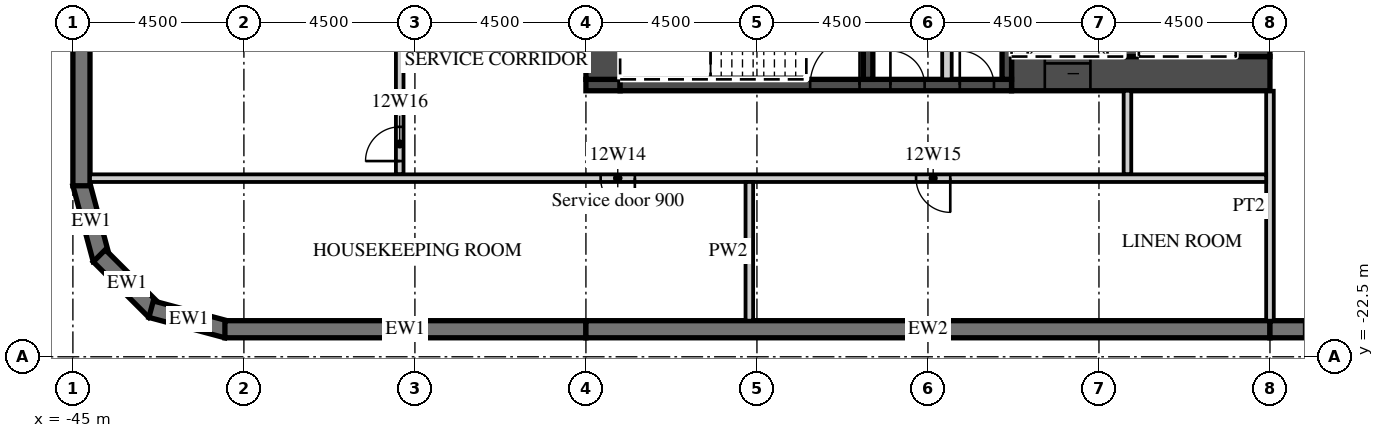
"""IFC4 building model, lengths in metres.
Left out: names, types, materials, properties, quantities, classifications, styles, units other than length and angle.
Written with IfcOpenShell. Run it as: python <this file> out.ifc"""

import sys

from ifc_helpers import new_model, si_unit, direction, frame, frame_2d, origin, place, context, subcontext, project, spatial, polyline, rectangle, outline, extrude, element, fill, save


model = new_model("IFC4")
c1 = context("Model", 3, precision=1e-05, world=origin(), true_north=direction((0.0, 1.0)))
c2 = subcontext(c1, "Body", "Model", "MODEL_VIEW")
j1 = project(units=[si_unit("LENGTHUNIT", "METRE"), si_unit("PLANEANGLEUNIT", "RADIAN")], contexts=[c1])
p1 = place(None, origin())
s1 = spatial("IfcSite", under=j1, at=p1, CompositionType="ELEMENT")
p2 = place(p1, origin())
s2 = spatial("IfcBuilding", under=s1, at=p2, CompositionType="ELEMENT")
p3 = place(p2, frame((0.0, 0.0, 69.9)))
s3 = spatial("IfcBuildingStorey", under=s2, at=p3, CompositionType="ELEMENT", Elevation=69.9)
p4 = place(p3, frame((-44.783, -17.942, 0.0), z_axis=(0.0, 0.0, 1.0), x_axis=(0.25881466832, -0.965926999034, 0.0)))
e1 = element("IfcWall", 1, at=p4, inside=s3, PredefinedType="SOLIDWALL", context=c2, shape_type="SweptSolid", body=[
    extrude(outline(polyline([(0.0, -0.225), (2.071, -0.225), (1.95, 0.225), (0.121, 0.225), (0.0, -0.225)])), origin(), (0.0, 0.0, 1.0), 3.02),
])
p5 = place(p3, frame((-44.305, -19.841, 0.0), z_axis=(0.0, 0.0, 1.0), x_axis=(0.707106781187, -0.707106781187, 0.0)))
e2 = element("IfcWall", 2, at=p5, inside=s3, PredefinedType="SOLIDWALL", context=c2, shape_type="SweptSolid", body=[
    extrude(outline(polyline([(0.0, -0.225), (2.071, -0.225), (1.95, 0.225), (0.121, 0.225), (0.0, -0.225)])), origin(), (0.0, 0.0, 1.0), 3.02),
])
p6 = place(p3, frame((-42.942, -21.247, 0.0), z_axis=(0.0, 0.0, 1.0), x_axis=(0.965926999034, -0.25881466832, 0.0)))
e3 = element("IfcWall", 3, at=p6, inside=s3, PredefinedType="SOLIDWALL", context=c2, shape_type="SweptSolid", body=[
    extrude(outline(polyline([(-0.0, -0.225), (2.07, -0.225), (1.95, 0.225), (0.12, 0.225), (-0.0, -0.225)])), origin(), (0.0, 0.0, 1.0), 3.02),
])
p7 = place(p3, frame((-41.0, -21.775, 0.0), z_axis=(0.0, 0.0, 1.0), x_axis=(1.0, 0.0, 0.0)))
e4 = element("IfcWall", 4, at=p7, inside=s3, PredefinedType="SOLIDWALL", context=c2, shape_type="SweptSolid", body=[
    extrude(rectangle(XDim=9.5, YDim=0.45, at=frame_2d((4.75, 0.0))), origin(), (0.0, 0.0, 1.0), 3.02),
])
p8 = place(p3, frame((-31.5, -21.775, 0.0), z_axis=(0.0, 0.0, 1.0), x_axis=(1.0, 0.0, 0.0)))
e5 = element("IfcWall", 5, at=p8, inside=s3, PredefinedType="SOLIDWALL", context=c2, shape_type="SweptSolid", body=[
    extrude(rectangle(XDim=18.0, YDim=0.45, at=frame_2d((9.0, 0.0))), origin(), (0.0, 0.0, 1.0), 3.02),
])
p9 = place(p3, frame((-13.5, -21.775, 0.0), z_axis=(0.0, 0.0, 1.0), x_axis=(1.0, 0.0, 0.0)))
e6 = element("IfcWall", 6, at=p9, inside=s3, PredefinedType="SOLIDWALL", context=c2, shape_type="SweptSolid", body=[
    extrude(rectangle(XDim=54.5, YDim=0.45, at=frame_2d((27.25, 0.0))), origin(), (0.0, 0.0, 1.0), 3.02),
])
p10 = place(p9, frame((0.9, 0.0, 0.45)))
e7 = element("IfcOpeningElement", 7, at=p10, cuts=e6, PredefinedType="OPENING", context=c2, shape_type="SweptSolid", body=[
    extrude(rectangle(XDim=2.7, YDim=2.25, at=frame_2d((1.35, 1.125))), frame((0.0, 0.235, 0.0), z_axis=(0.0, -1.0, 0.0), x_axis=(1.0, 0.0, 0.0)), (0.0, 0.0, 1.0), 0.47),
])
p11 = place(p9, frame((5.4, 0.0, 0.45)))
e8 = element("IfcOpeningElement", 8, at=p11, cuts=e6, PredefinedType="OPENING", context=c2, shape_type="SweptSolid", body=[
    extrude(rectangle(XDim=2.7, YDim=2.25, at=frame_2d((1.35, 1.125))), frame((0.0, 0.235, 0.0), z_axis=(0.0, -1.0, 0.0), x_axis=(1.0, 0.0, 0.0)), (0.0, 0.0, 1.0), 0.47),
])
p12 = place(p9, frame((9.9, 0.0, 0.45)))
e9 = element("IfcOpeningElement", 9, at=p12, cuts=e6, PredefinedType="OPENING", context=c2, shape_type="SweptSolid", body=[
    extrude(rectangle(XDim=2.7, YDim=2.25, at=frame_2d((1.35, 1.125))), frame((0.0, 0.235, 0.0), z_axis=(0.0, -1.0, 0.0), x_axis=(1.0, 0.0, 0.0)), (0.0, 0.0, 1.0), 0.47),
])
p13 = place(p9, frame((14.4, 0.0, 0.45)))
e10 = element("IfcOpeningElement", 10, at=p13, cuts=e6, PredefinedType="OPENING", context=c2, shape_type="SweptSolid", body=[
    extrude(rectangle(XDim=2.7, YDim=2.25, at=frame_2d((1.35, 1.125))), frame((0.0, 0.235, 0.0), z_axis=(0.0, -1.0, 0.0), x_axis=(1.0, 0.0, 0.0)), (0.0, 0.0, 1.0), 0.47),
])
p14 = place(p9, frame((18.9, 0.0, 0.45)))
e11 = element("IfcOpeningElement", 11, at=p14, cuts=e6, PredefinedType="OPENING", context=c2, shape_type="SweptSolid", body=[
    extrude(rectangle(XDim=2.7, YDim=2.25, at=frame_2d((1.35, 1.125))), frame((0.0, 0.235, 0.0), z_axis=(0.0, -1.0, 0.0), x_axis=(1.0, 0.0, 0.0)), (0.0, 0.0, 1.0), 0.47),
])
p15 = place(p9, frame((23.4, 0.0, 0.45)))
e12 = element("IfcOpeningElement", 12, at=p15, cuts=e6, PredefinedType="OPENING", context=c2, shape_type="SweptSolid", body=[
    extrude(rectangle(XDim=2.7, YDim=2.25, at=frame_2d((1.35, 1.125))), frame((0.0, 0.235, 0.0), z_axis=(0.0, -1.0, 0.0), x_axis=(1.0, 0.0, 0.0)), (0.0, 0.0, 1.0), 0.47),
])
p16 = place(p9, frame((27.9, 0.0, 0.45)))
e13 = element("IfcOpeningElement", 13, at=p16, cuts=e6, PredefinedType="OPENING", context=c2, shape_type="SweptSolid", body=[
    extrude(rectangle(XDim=2.7, YDim=2.25, at=frame_2d((1.35, 1.125))), frame((0.0, 0.235, 0.0), z_axis=(0.0, -1.0, 0.0), x_axis=(1.0, 0.0, 0.0)), (0.0, 0.0, 1.0), 0.47),
])
p17 = place(p9, frame((32.4, 0.0, 0.45)))
e14 = element("IfcOpeningElement", 14, at=p17, cuts=e6, PredefinedType="OPENING", context=c2, shape_type="SweptSolid", body=[
    extrude(rectangle(XDim=2.7, YDim=2.25, at=frame_2d((1.35, 1.125))), frame((0.0, 0.235, 0.0), z_axis=(0.0, -1.0, 0.0), x_axis=(1.0, 0.0, 0.0)), (0.0, 0.0, 1.0), 0.47),
])
p18 = place(p9, frame((36.9, 0.0, 0.45)))
e15 = element("IfcOpeningElement", 15, at=p18, cuts=e6, PredefinedType="OPENING", context=c2, shape_type="SweptSolid", body=[
    extrude(rectangle(XDim=2.7, YDim=2.25, at=frame_2d((1.35, 1.125))), frame((0.0, 0.235, 0.0), z_axis=(0.0, -1.0, 0.0), x_axis=(1.0, 0.0, 0.0)), (0.0, 0.0, 1.0), 0.47),
])
p19 = place(p9, frame((41.4, 0.0, 0.45)))
e16 = element("IfcOpeningElement", 16, at=p19, cuts=e6, PredefinedType="OPENING", context=c2, shape_type="SweptSolid", body=[
    extrude(rectangle(XDim=2.7, YDim=2.25, at=frame_2d((1.35, 1.125))), frame((0.0, 0.235, 0.0), z_axis=(0.0, -1.0, 0.0), x_axis=(1.0, 0.0, 0.0)), (0.0, 0.0, 1.0), 0.47),
])
p20 = place(p9, frame((45.9, 0.0, 0.45)))
e17 = element("IfcOpeningElement", 17, at=p20, cuts=e6, PredefinedType="OPENING", context=c2, shape_type="SweptSolid", body=[
    extrude(rectangle(XDim=2.7, YDim=2.25, at=frame_2d((1.35, 1.125))), frame((0.0, 0.235, 0.0), z_axis=(0.0, -1.0, 0.0), x_axis=(1.0, 0.0, 0.0)), (0.0, 0.0, 1.0), 0.47),
])
p21 = place(p9, frame((50.4, 0.0, 0.45)))
e18 = element("IfcOpeningElement", 18, at=p21, cuts=e6, PredefinedType="OPENING", context=c2, shape_type="SweptSolid", body=[
    extrude(rectangle(XDim=2.7, YDim=2.25, at=frame_2d((1.35, 1.125))), frame((0.0, 0.235, 0.0), z_axis=(0.0, -1.0, 0.0), x_axis=(1.0, 0.0, 0.0)), (0.0, 0.0, 1.0), 0.47),
])
p22 = place(p3, frame((-44.775, 18.0, 0.0), z_axis=(0.0, 0.0, 1.0), x_axis=(0.0, -1.0, 0.0)))
e19 = element("IfcWall", 19, at=p22, inside=s3, PredefinedType="SOLIDWALL", context=c2, shape_type="SweptSolid", body=[
    extrude(rectangle(XDim=36.0, YDim=0.45, at=frame_2d((18.0, 0.0))), origin(), (0.0, 0.0, 1.0), 3.02),
])
p23 = place(p22, frame((3.9, 0.0, 0.45)))
e20 = element("IfcOpeningElement", 20, at=p23, cuts=e19, PredefinedType="OPENING", context=c2, shape_type="SweptSolid", body=[
    extrude(rectangle(XDim=3.3, YDim=2.25, at=frame_2d((1.65, 1.125))), frame((0.0, 0.235, 0.0), z_axis=(0.0, -1.0, 0.0), x_axis=(1.0, 0.0, 0.0)), (0.0, 0.0, 1.0), 0.47),
])
p24 = place(p22, frame((8.4, 0.0, 0.45)))
e21 = element("IfcOpeningElement", 21, at=p24, cuts=e19, PredefinedType="OPENING", context=c2, shape_type="SweptSolid", body=[
    extrude(rectangle(XDim=3.3, YDim=2.25, at=frame_2d((1.65, 1.125))), frame((0.0, 0.235, 0.0), z_axis=(0.0, -1.0, 0.0), x_axis=(1.0, 0.0, 0.0)), (0.0, 0.0, 1.0), 0.47),
])
p25 = place(p22, frame((12.9, 0.0, 0.45)))
e22 = element("IfcOpeningElement", 22, at=p25, cuts=e19, PredefinedType="OPENING", context=c2, shape_type="SweptSolid", body=[
    extrude(rectangle(XDim=3.3, YDim=2.25, at=frame_2d((1.65, 1.125))), frame((0.0, 0.235, 0.0), z_axis=(0.0, -1.0, 0.0), x_axis=(1.0, 0.0, 0.0)), (0.0, 0.0, 1.0), 0.47),
])
p26 = place(p3, frame((-13.5, -21.55, 0.0), z_axis=(0.0, 0.0, 1.0), x_axis=(0.0, 1.0, 0.0)))
e23 = element("IfcWall", 23, at=p26, inside=s3, PredefinedType="PARTITIONING", context=c2, shape_type="SweptSolid", body=[
    extrude(rectangle(XDim=6.05, YDim=0.2, at=frame_2d((3.025, 0.0))), origin(), (0.0, 0.0, 1.0), 3.02),
])
p27 = place(p3, frame((-20.3, -15.05, 0.0), z_axis=(0.0, 0.0, 1.0), x_axis=(1.0, 0.0, 0.0)))
e24 = element("IfcWall", 24, at=p27, inside=s3, PredefinedType="SHEAR", context=c2, shape_type="SweptSolid", body=[
    extrude(rectangle(XDim=6.8, YDim=0.9, at=frame_2d((3.4, 0.0))), origin(), (0.0, 0.0, 1.0), 3.02),
])
p28 = place(p27, frame((0.875, 0.0, 0.0)))
e25 = element("IfcOpeningElement", 25, at=p28, cuts=e24, PredefinedType="OPENING", context=c2, shape_type="SweptSolid", body=[
    extrude(rectangle(XDim=1.2, YDim=2.1, at=frame_2d((0.6, 1.05))), frame((0.0, 0.46, 0.0), z_axis=(0.0, -1.0, 0.0), x_axis=(1.0, 0.0, 0.0)), (0.0, 0.0, 1.0), 0.92),
])
p29 = place(p3, frame((-31.5, -15.35, 0.0), z_axis=(0.0, 0.0, 1.0), x_axis=(1.0, 0.0, 0.0)))
e26 = element("IfcWall", 26, at=p29, inside=s3, PredefinedType="SHEAR", context=c2, shape_type="SweptSolid", body=[
    extrude(rectangle(XDim=0.9, YDim=0.3, at=frame_2d((0.45, 0.0))), origin(), (0.0, 0.0, 1.0), 3.02),
])
p30 = place(p3, frame((-30.6, -15.35, 0.0), z_axis=(0.0, 0.0, 1.0), x_axis=(1.0, 0.0, 0.0)))
e27 = element("IfcWall", 27, at=p30, inside=s3, PredefinedType="SHEAR", context=c2, shape_type="SweptSolid", body=[
    extrude(rectangle(XDim=10.3, YDim=0.3, at=frame_2d((5.15, 0.0))), origin(), (0.0, 0.0, 1.0), 3.02),
])
p31 = place(p30, frame((5.0, 0.0, 0.0)))
e28 = element("IfcOpeningElement", 28, at=p31, cuts=e27, PredefinedType="OPENING", context=c2, shape_type="SweptSolid", body=[
    extrude(rectangle(XDim=1.3, YDim=2.1, at=frame_2d((0.65, 1.05))), frame((0.0, 0.16, 0.0), z_axis=(0.0, -1.0, 0.0), x_axis=(1.0, 0.0, 0.0)), (0.0, 0.0, 1.0), 0.32),
])
p32 = place(p30, frame((7.113, 0.0, 0.0)))
e29 = element("IfcOpeningElement", 29, at=p32, cuts=e27, PredefinedType="OPENING", context=c2, shape_type="SweptSolid", body=[
    extrude(rectangle(XDim=0.9, YDim=2.1, at=frame_2d((0.45, 1.05))), frame((0.0, 0.16, 0.0), z_axis=(0.0, -1.0, 0.0), x_axis=(1.0, 0.0, 0.0)), (0.0, 0.0, 1.0), 0.32),
])
p33 = place(p30, frame((8.938, 0.0, 0.0)))
e30 = element("IfcOpeningElement", 30, at=p33, cuts=e27, PredefinedType="OPENING", context=c2, shape_type="SweptSolid", body=[
    extrude(rectangle(XDim=0.9, YDim=2.1, at=frame_2d((0.45, 1.05))), frame((0.0, 0.16, 0.0), z_axis=(0.0, -1.0, 0.0), x_axis=(1.0, 0.0, 0.0)), (0.0, 0.0, 1.0), 0.32),
])
p34 = place(p3, frame((-31.05, -15.2, 0.0), z_axis=(0.0, 0.0, 1.0), x_axis=(0.0, 1.0, 0.0)))
e31 = element("IfcWall", 31, at=p34, inside=s3, PredefinedType="SHEAR", context=c2, shape_type="SweptSolid", body=[
    extrude(rectangle(XDim=12.8, YDim=0.9, at=frame_2d((6.4, 0.0))), origin(), (0.0, 0.0, 1.0), 3.02),
])
p35 = place(p34, frame((11.5, 0.0, 0.0)))
e32 = element("IfcOpeningElement", 32, at=p35, cuts=e31, PredefinedType="OPENING", context=c2, shape_type="SweptSolid", body=[
    extrude(rectangle(XDim=1.1, YDim=2.1, at=frame_2d((0.55, 1.05))), frame((0.0, 0.46, 0.0), z_axis=(0.0, -1.0, 0.0), x_axis=(1.0, 0.0, 0.0)), (0.0, 0.0, 1.0), 0.92),
])
p36 = place(p3, frame((-13.95, -14.6, 0.0), z_axis=(0.0, 0.0, 1.0), x_axis=(0.0, 1.0, 0.0)))
e33 = element("IfcWall", 33, at=p36, inside=s3, PredefinedType="SHEAR", context=c2, shape_type="SweptSolid", body=[
    extrude(rectangle(XDim=12.2, YDim=0.9, at=frame_2d((6.1, 0.0))), origin(), (0.0, 0.0, 1.0), 3.02),
])
p37 = place(p3, frame((-17.15, -14.6, 0.0), z_axis=(0.0, 0.0, 1.0), x_axis=(0.0, 1.0, 0.0)))
e34 = element("IfcWall", 34, at=p37, inside=s3, PredefinedType="SHEAR", context=c2, shape_type="SweptSolid", body=[
    extrude(rectangle(XDim=5.8, YDim=0.4, at=frame_2d((2.9, 0.0))), origin(), (0.0, 0.0, 1.0), 3.02),
])
for number, where, z_axis, x_axis in (
    (35, (-20.425, -15.2, 0.0), (0.0, 0.0, 1.0), (0.0, 1.0, 0.0)),
    (36, (-24.075, -15.2, 0.0), (0.0, 0.0, 1.0), (0.0, 1.0, 0.0)),
):
    element("IfcWall", number, at=place(p3, frame(where, z_axis=z_axis, x_axis=x_axis)), inside=s3, PredefinedType="SHEAR", context=c2, shape_type="SweptSolid", body=[
        extrude(rectangle(XDim=3.25, YDim=0.25, at=frame_2d((1.625, 0.0))), origin(), (0.0, 0.0, 1.0), 3.02),
    ])
p38 = place(p3, frame((-22.0, -15.2, 0.0), z_axis=(0.0, 0.0, 1.0), x_axis=(0.0, 1.0, 0.0)))
e37 = element("IfcWall", 37, at=p38, inside=s3, PredefinedType="PARTITIONING", context=c2, shape_type="SweptSolid", body=[
    extrude(rectangle(XDim=3.25, YDim=0.25, at=frame_2d((1.625, 0.0))), origin(), (0.0, 0.0, 1.0), 3.02),
])
p39 = place(p3, frame((-17.25, -17.7, 0.0), z_axis=(0.0, 0.0, 1.0), x_axis=(0.0, 1.0, 0.0)))
e38 = element("IfcWall", 38, at=p39, inside=s3, PredefinedType="PARTITIONING", context=c2, shape_type="SweptSolid", body=[
    extrude(rectangle(XDim=2.2, YDim=0.2, at=frame_2d((1.1, 0.0))), origin(), (0.0, 0.0, 1.0), 3.02),
])
p40 = place(p3, frame((-36.4, -17.7, 0.0), z_axis=(0.0, 0.0, 1.0), x_axis=(0.0, 1.0, 0.0)))
e39 = element("IfcWall", 39, at=p40, inside=s3, PredefinedType="PARTITIONING", context=c2, shape_type="SweptSolid", body=[
    extrude(rectangle(XDim=15.95, YDim=0.2, at=frame_2d((7.975, 0.0))), origin(), (0.0, 0.0, 1.0), 3.02),
])
p41 = place(p40, frame((0.35, 0.0, 0.0)))
e40 = element("IfcOpeningElement", 40, at=p41, cuts=e39, PredefinedType="OPENING", context=c2, shape_type="SweptSolid", body=[
    extrude(rectangle(XDim=0.9, YDim=2.1, at=frame_2d((0.45, 1.05))), frame((0.0, 0.11, 0.0), z_axis=(0.0, -1.0, 0.0), x_axis=(1.0, 0.0, 0.0)), (0.0, 0.0, 1.0), 0.22),
])
p42 = place(p3, frame((-44.55, -17.8, 0.0), z_axis=(0.0, 0.0, 1.0), x_axis=(1.0, 0.0, 0.0)))
e41 = element("IfcWall", 41, at=p42, inside=s3, PredefinedType="PARTITIONING", context=c2, shape_type="SweptSolid", body=[
    extrude(rectangle(XDim=30.95, YDim=0.2, at=frame_2d((15.475, 0.0))), origin(), (0.0, 0.0, 1.0), 3.02),
])
p43 = place(p42, frame((13.438, 0.0, 0.0)))
e42 = element("IfcOpeningElement", 42, at=p43, cuts=e41, PredefinedType="OPENING", context=c2, shape_type="SweptSolid", body=[
    extrude(rectangle(XDim=0.9, YDim=2.1, at=frame_2d((0.45, 1.05))), frame((0.0, 0.11, 0.0), z_axis=(0.0, -1.0, 0.0), x_axis=(1.0, 0.0, 0.0)), (0.0, 0.0, 1.0), 0.22),
])
p44 = place(p42, frame((21.738, 0.0, 0.0)))
e43 = element("IfcOpeningElement", 43, at=p44, cuts=e41, PredefinedType="OPENING", context=c2, shape_type="SweptSolid", body=[
    extrude(rectangle(XDim=0.9, YDim=2.1, at=frame_2d((0.45, 1.05))), frame((0.0, 0.11, 0.0), z_axis=(0.0, -1.0, 0.0), x_axis=(1.0, 0.0, 0.0)), (0.0, 0.0, 1.0), 0.22),
])
p45 = place(p3, frame((-27.2, -21.55, 0.0), z_axis=(0.0, 0.0, 1.0), x_axis=(0.0, 1.0, 0.0)))
e44 = element("IfcWall", 44, at=p45, inside=s3, PredefinedType="PARTITIONING", context=c2, shape_type="SweptSolid", body=[
    extrude(rectangle(XDim=3.65, YDim=0.2, at=frame_2d((1.825, 0.0))), origin(), (0.0, 0.0, 1.0), 3.02),
])
p46 = place(p28, origin())
e45 = element("IfcDoor", 45, at=p46, inside=s3, OperationType="SLIDING_TO_LEFT", PredefinedType="DOOR", context=c2, shape_type="SweptSolid", body=[
    extrude(rectangle(XDim=1.2, YDim=2.1, at=frame_2d((0.6, 1.05))), frame((0.0, 0.025, 0.0), z_axis=(0.0, -1.0, 0.0), x_axis=(1.0, 0.0, 0.0)), (0.0, 0.0, 1.0), 0.05),
])
fill(e25, e45)
p47 = place(p31, origin())
e46 = element("IfcDoor", 46, at=p47, inside=s3, OperationType="SINGLE_SWING_RIGHT", PredefinedType="DOOR", context=c2, shape_type="SweptSolid", body=[
    extrude(rectangle(XDim=1.3, YDim=2.1, at=frame_2d((0.65, 1.05))), frame((0.0, 0.025, 0.0), z_axis=(0.0, -1.0, 0.0), x_axis=(1.0, 0.0, 0.0)), (0.0, 0.0, 1.0), 0.05),
])
fill(e28, e46)
p48 = place(p32, origin())
e47 = element("IfcDoor", 47, at=p48, inside=s3, OperationType="SINGLE_SWING_LEFT", PredefinedType="DOOR", context=c2, shape_type="SweptSolid", body=[
    extrude(rectangle(XDim=0.9, YDim=2.1, at=frame_2d((0.45, 1.05))), frame((0.0, 0.025, 0.0), z_axis=(0.0, -1.0, 0.0), x_axis=(1.0, 0.0, 0.0)), (0.0, 0.0, 1.0), 0.05),
])
fill(e29, e47)
p49 = place(p33, origin())
e48 = element("IfcDoor", 48, at=p49, inside=s3, OperationType="SINGLE_SWING_LEFT", PredefinedType="DOOR", context=c2, shape_type="SweptSolid", body=[
    extrude(rectangle(XDim=0.9, YDim=2.1, at=frame_2d((0.45, 1.05))), frame((0.0, 0.025, 0.0), z_axis=(0.0, -1.0, 0.0), x_axis=(1.0, 0.0, 0.0)), (0.0, 0.0, 1.0), 0.05),
])
fill(e30, e48)
p50 = place(p43, origin())
e49 = element("IfcDoor", 49, at=p50, inside=s3, OperationType="SINGLE_SWING_RIGHT", PredefinedType="DOOR", context=c2, shape_type="SweptSolid", body=[
    extrude(rectangle(XDim=0.9, YDim=2.1, at=frame_2d((0.45, 1.05))), frame((0.0, 0.025, 0.0), z_axis=(0.0, -1.0, 0.0), x_axis=(1.0, 0.0, 0.0)), (0.0, 0.0, 1.0), 0.05),
])
fill(e42, e49)
p51 = place(p44, origin())
e50 = element("IfcDoor", 50, at=p51, inside=s3, OperationType="SINGLE_SWING_RIGHT", PredefinedType="DOOR", context=c2, shape_type="SweptSolid", body=[
    extrude(rectangle(XDim=0.9, YDim=2.1, at=frame_2d((0.45, 1.05))), frame((0.0, 0.025, 0.0), z_axis=(0.0, -1.0, 0.0), x_axis=(1.0, 0.0, 0.0)), (0.0, 0.0, 1.0), 0.05),
])
fill(e43, e50)
p52 = place(p41, origin())
e51 = element("IfcDoor", 51, at=p52, inside=s3, OperationType="SINGLE_SWING_LEFT", PredefinedType="DOOR", context=c2, shape_type="SweptSolid", body=[
    extrude(rectangle(XDim=0.9, YDim=2.1, at=frame_2d((0.45, 1.05))), frame((0.0, 0.025, 0.0), z_axis=(0.0, -1.0, 0.0), x_axis=(1.0, 0.0, 0.0)), (0.0, 0.0, 1.0), 0.05),
])
fill(e40, e51)
save(model, sys.argv[1])
